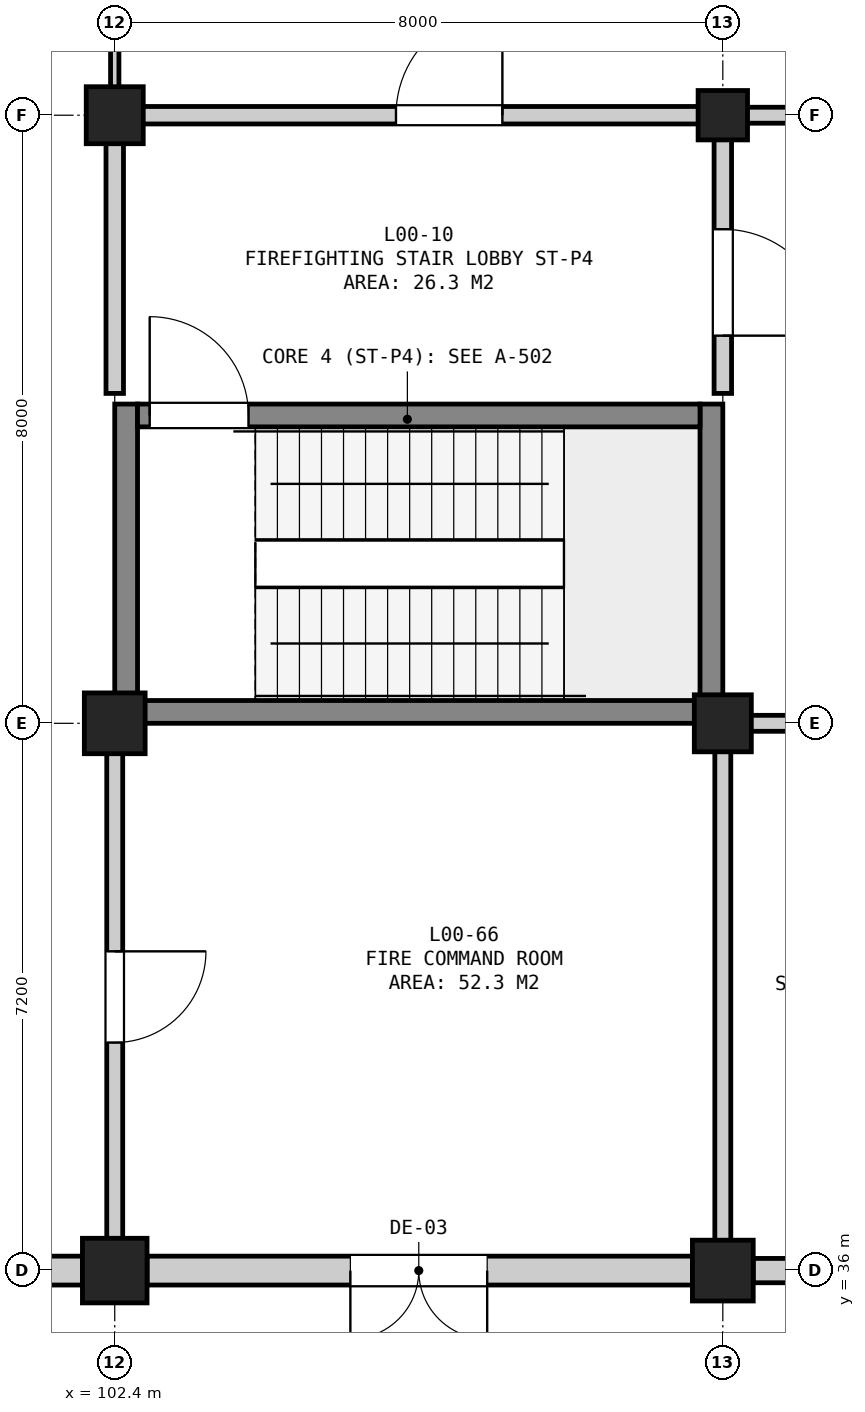
"""IFC4 building model, lengths in metres.
Left out: names, types, materials, properties, quantities, classifications, styles, units other than length and angle.
Written with IfcOpenShell. Run it as: python <this file> out.ifc"""

import sys

from ifc_helpers import new_model, si_unit, direction, frame, frame_2d, origin, origin_2d, place, context, subcontext, project, spatial, rectangle, extrude, element, fill, save


model = new_model("IFC4")
c1 = context("Model", 3, precision=1e-05, world=origin(), true_north=direction((0.0, 1.0)))
c2 = subcontext(c1, "Body", "Model", "MODEL_VIEW")
j1 = project(units=[si_unit("LENGTHUNIT", "METRE"), si_unit("PLANEANGLEUNIT", "RADIAN")], contexts=[c1])
p1 = place(None, origin())
s1 = spatial("IfcSite", under=j1, at=p1, CompositionType="ELEMENT")
p2 = place(p1, origin())
s2 = spatial("IfcBuilding", under=s1, at=p2, CompositionType="ELEMENT")
p3 = place(p2, origin())
s3 = spatial("IfcBuildingStorey", under=s2, at=p3, CompositionType="ELEMENT", Elevation=0.0)
p4 = place(p3, frame((102.4, 36.0, 0.0), z_axis=(0.0, 0.0, 1.0), x_axis=(1.0, 0.0, 0.0)))
e1 = element("IfcColumn", 1, at=p4, inside=s3, PredefinedType="COLUMN", context=c2, shape_type="SweptSolid", body=[
    extrude(rectangle(XDim=0.85, YDim=0.85, at=origin_2d()), origin(), (0.0, 0.0, 1.0), 5.4),
])
p5 = place(p3, frame((102.4, 43.2, 0.0), z_axis=(0.0, 0.0, 1.0), x_axis=(1.0, 0.0, 0.0)))
e2 = element("IfcColumn", 2, at=p5, inside=s3, PredefinedType="COLUMN", context=c2, shape_type="SweptSolid", body=[
    extrude(rectangle(XDim=0.8, YDim=0.8, at=origin_2d()), origin(), (0.0, 0.0, 1.0), 5.4),
])
p6 = place(p3, frame((102.4, 51.2, 0.0), z_axis=(0.0, 0.0, 1.0), x_axis=(1.0, 0.0, 0.0)))
e3 = element("IfcColumn", 3, at=p6, inside=s3, PredefinedType="COLUMN", context=c2, shape_type="SweptSolid", body=[
    extrude(rectangle(XDim=0.75, YDim=0.75, at=origin_2d()), origin(), (0.0, 0.0, 1.0), 5.4),
])
p7 = place(p3, frame((110.4, 36.0, 0.0), z_axis=(0.0, 0.0, 1.0), x_axis=(1.0, 0.0, 0.0)))
e4 = element("IfcColumn", 4, at=p7, inside=s3, PredefinedType="COLUMN", context=c2, shape_type="SweptSolid", body=[
    extrude(rectangle(XDim=0.8, YDim=0.8, at=origin_2d()), origin(), (0.0, 0.0, 1.0), 5.4),
])
p8 = place(p3, frame((110.4, 43.2, 0.0), z_axis=(0.0, 0.0, 1.0), x_axis=(1.0, 0.0, 0.0)))
e5 = element("IfcColumn", 5, at=p8, inside=s3, PredefinedType="COLUMN", context=c2, shape_type="SweptSolid", body=[
    extrude(rectangle(XDim=0.75, YDim=0.75, at=origin_2d()), origin(), (0.0, 0.0, 1.0), 5.4),
])
p9 = place(p3, frame((110.4, 51.2, 0.0), z_axis=(0.0, 0.0, 1.0), x_axis=(1.0, 0.0, 0.0)))
e6 = element("IfcColumn", 6, at=p9, inside=s3, PredefinedType="COLUMN", context=c2, shape_type="SweptSolid", body=[
    extrude(rectangle(XDim=0.65, YDim=0.65, at=origin_2d()), origin(), (0.0, 0.0, 1.0), 5.4),
])
p10 = place(p3, frame((86.6, 36.0, 0.0), z_axis=(0.0, 0.0, 1.0), x_axis=(1.0, 0.0, 0.0)))
e7 = element("IfcWall", 7, at=p10, inside=s3, PredefinedType="SOLIDWALL", context=c2, shape_type="SweptSolid", body=[
    extrude(rectangle(XDim=15.375, YDim=0.38, at=frame_2d((7.688, 0.0))), origin(), (0.0, 0.0, 1.0), 4.065),
])
p11 = place(p10, frame((3.6, 0.0, 0.0)))
e8 = element("IfcOpeningElement", 8, at=p11, cuts=e7, PredefinedType="OPENING", context=c2, shape_type="SweptSolid", body=[
    extrude(rectangle(XDim=2.0, YDim=2.5, at=frame_2d((1.0, 1.25))), frame((0.0, 0.202, 0.0), z_axis=(0.0, -1.0, 0.0), x_axis=(1.0, 0.0, 0.0)), (0.0, 0.0, 1.0), 0.404),
])
p12 = place(p10, frame((10.8, 0.0, 0.0)))
e9 = element("IfcOpeningElement", 9, at=p12, cuts=e7, PredefinedType="OPENING", context=c2, shape_type="SweptSolid", body=[
    extrude(rectangle(XDim=2.0, YDim=2.5, at=frame_2d((1.0, 1.25))), frame((0.0, 0.202, 0.0), z_axis=(0.0, -1.0, 0.0), x_axis=(1.0, 0.0, 0.0)), (0.0, 0.0, 1.0), 0.404),
])
p13 = place(p3, frame((102.825, 36.0, 0.0), z_axis=(0.0, 0.0, 1.0), x_axis=(1.0, 0.0, 0.0)))
e10 = element("IfcWall", 10, at=p13, inside=s3, PredefinedType="SOLIDWALL", context=c2, shape_type="SweptSolid", body=[
    extrude(rectangle(XDim=7.175, YDim=0.38, at=frame_2d((3.587, 0.0))), origin(), (0.0, 0.0, 1.0), 4.48),
])
p14 = place(p13, frame((2.675, 0.0, 0.0)))
e11 = element("IfcOpeningElement", 11, at=p14, cuts=e10, PredefinedType="OPENING", context=c2, shape_type="SweptSolid", body=[
    extrude(rectangle(XDim=1.8, YDim=2.25, at=frame_2d((0.9, 1.125))), frame((0.0, 0.202, 0.0), z_axis=(0.0, -1.0, 0.0), x_axis=(1.0, 0.0, 0.0)), (0.0, 0.0, 1.0), 0.404),
])
p15 = place(p3, frame((110.8, 36.0, 0.0), z_axis=(0.0, 0.0, 1.0), x_axis=(1.0, 0.0, 0.0)))
e12 = element("IfcWall", 12, at=p15, inside=s3, PredefinedType="SOLIDWALL", context=c2, shape_type="SweptSolid", body=[
    extrude(rectangle(XDim=5.625, YDim=0.32, at=frame_2d((2.812, 0.0))), origin(), (0.0, 0.0, 1.0), 4.465),
])
p16 = place(p15, frame((1.9, 0.0, 0.0)))
e13 = element("IfcOpeningElement", 13, at=p16, cuts=e12, PredefinedType="OPENING", context=c2, shape_type="SweptSolid", body=[
    extrude(rectangle(XDim=1.8, YDim=2.25, at=frame_2d((0.9, 1.125))), frame((0.0, 0.172, 0.0), z_axis=(0.0, -1.0, 0.0), x_axis=(1.0, 0.0, 0.0)), (0.0, 0.0, 1.0), 0.344),
])
for number, where, z_axis, x_axis in (
    (14, (102.55, 43.2, 0.0), (0.0, 0.0, 1.0), (0.0, 1.0, 0.0)),
    (15, (110.25, 43.2, 0.0), (0.0, 0.0, 1.0), (0.0, 1.0, 0.0)),
):
    element("IfcWall", number, at=place(p3, frame(where, z_axis=z_axis, x_axis=x_axis)), inside=s3, PredefinedType="SHEAR", context=c2, shape_type="SweptSolid", body=[
        extrude(rectangle(XDim=4.2, YDim=0.3, at=frame_2d((2.1, 0.0))), origin(), (0.0, 0.0, 1.0), 5.08),
    ])
p17 = place(p3, frame((102.7, 43.35, 0.0), z_axis=(0.0, 0.0, 1.0), x_axis=(1.0, 0.0, 0.0)))
e16 = element("IfcWall", 16, at=p17, inside=s3, PredefinedType="SHEAR", context=c2, shape_type="SweptSolid", body=[
    extrude(rectangle(XDim=7.4, YDim=0.3, at=frame_2d((3.7, 0.0))), origin(), (0.0, 0.0, 1.0), 5.08),
])
p18 = place(p3, frame((102.7, 47.25, 0.0), z_axis=(0.0, 0.0, 1.0), x_axis=(1.0, 0.0, 0.0)))
e17 = element("IfcWall", 17, at=p18, inside=s3, PredefinedType="SHEAR", context=c2, shape_type="SweptSolid", body=[
    extrude(rectangle(XDim=7.4, YDim=0.3, at=frame_2d((3.7, 0.0))), origin(), (0.0, 0.0, 1.0), 5.08),
])
p19 = place(p18, frame((0.16, 0.0, 0.0)))
e18 = element("IfcOpeningElement", 18, at=p19, cuts=e17, PredefinedType="OPENING", context=c2, shape_type="SweptSolid", body=[
    extrude(rectangle(XDim=1.3, YDim=2.18, at=frame_2d((0.65, 1.09))), frame((0.0, 0.162, 0.0), z_axis=(0.0, -1.0, 0.0), x_axis=(1.0, 0.0, 0.0)), (0.0, 0.0, 1.0), 0.324),
])
p20 = place(p3, frame((102.54, 51.2, 0.0), z_axis=(0.0, 0.0, 1.0), x_axis=(1.0, 0.0, 0.0)))
e19 = element("IfcWall", 19, at=p20, inside=s3, PredefinedType="SOLIDWALL", context=c2, shape_type="SweptSolid", body=[
    extrude(rectangle(XDim=7.72, YDim=0.23, at=frame_2d((3.86, 0.0))), origin(), (0.0, 0.0, 1.0), 4.815),
])
p21 = place(p20, frame((3.56, 0.0, 0.0)))
e20 = element("IfcOpeningElement", 20, at=p21, cuts=e19, PredefinedType="OPENING", context=c2, shape_type="SweptSolid", body=[
    extrude(rectangle(XDim=1.4, YDim=2.2, at=frame_2d((0.7, 1.1))), frame((0.0, 0.127, 0.0), z_axis=(0.0, -1.0, 0.0), x_axis=(1.0, 0.0, 0.0)), (0.0, 0.0, 1.0), 0.254),
])
p22 = place(p3, frame((102.4, 47.54, 0.0), z_axis=(0.0, 0.0, 1.0), x_axis=(0.0, 1.0, 0.0)))
e21 = element("IfcWall", 21, at=p22, inside=s3, PredefinedType="SOLIDWALL", context=c2, shape_type="SweptSolid", body=[
    extrude(rectangle(XDim=3.52, YDim=0.23, at=frame_2d((1.76, 0.0))), origin(), (0.0, 0.0, 1.0), 4.325),
])
p23 = place(p3, frame((110.4, 47.54, 0.0), z_axis=(0.0, 0.0, 1.0), x_axis=(0.0, 1.0, 0.0)))
e22 = element("IfcWall", 22, at=p23, inside=s3, PredefinedType="SOLIDWALL", context=c2, shape_type="SweptSolid", body=[
    extrude(rectangle(XDim=3.52, YDim=0.23, at=frame_2d((1.76, 0.0))), origin(), (0.0, 0.0, 1.0), 4.625),
])
p24 = place(p23, frame((0.76, 0.0, 0.0)))
e23 = element("IfcOpeningElement", 23, at=p24, cuts=e22, PredefinedType="OPENING", context=c2, shape_type="SweptSolid", body=[
    extrude(rectangle(XDim=1.4, YDim=2.2, at=frame_2d((0.7, 1.1))), frame((0.0, 0.127, 0.0), z_axis=(0.0, -1.0, 0.0), x_axis=(1.0, 0.0, 0.0)), (0.0, 0.0, 1.0), 0.254),
])
p25 = place(p3, frame((110.54, 43.2, 0.0), z_axis=(0.0, 0.0, 1.0), x_axis=(1.0, 0.0, 0.0)))
e24 = element("IfcWall", 24, at=p25, inside=s3, PredefinedType="SOLIDWALL", context=c2, shape_type="SweptSolid", body=[
    extrude(rectangle(XDim=6.12, YDim=0.21, at=frame_2d((3.06, 0.0))), origin(), (0.0, 0.0, 1.0), 4.225),
])
p26 = place(p25, frame((2.26, 0.0, 0.0)))
e25 = element("IfcOpeningElement", 25, at=p26, cuts=e24, PredefinedType="OPENING", context=c2, shape_type="SweptSolid", body=[
    extrude(rectangle(XDim=1.6, YDim=2.2, at=frame_2d((0.8, 1.1))), frame((0.0, 0.117, 0.0), z_axis=(0.0, -1.0, 0.0), x_axis=(1.0, 0.0, 0.0)), (0.0, 0.0, 1.0), 0.234),
])
p27 = place(p3, frame((110.54, 51.2, 0.0), z_axis=(0.0, 0.0, 1.0), x_axis=(1.0, 0.0, 0.0)))
e26 = element("IfcWall", 26, at=p27, inside=s3, PredefinedType="SOLIDWALL", context=c2, shape_type="SweptSolid", body=[
    extrude(rectangle(XDim=6.12, YDim=0.21, at=frame_2d((3.06, 0.0))), origin(), (0.0, 0.0, 1.0), 4.225),
])
p28 = place(p3, frame((110.4, 36.105, 0.0), z_axis=(0.0, 0.0, 1.0), x_axis=(0.0, 1.0, 0.0)))
e27 = element("IfcWall", 27, at=p28, inside=s3, PredefinedType="SOLIDWALL", context=c2, shape_type="SweptSolid", body=[
    extrude(rectangle(XDim=6.955, YDim=0.21, at=frame_2d((3.478, 0.0))), origin(), (0.0, 0.0, 1.0), 4.525),
])
p29 = place(p3, frame((102.4, 36.105, 0.0), z_axis=(0.0, 0.0, 1.0), x_axis=(0.0, 1.0, 0.0)))
e28 = element("IfcWall", 28, at=p29, inside=s3, PredefinedType="SOLIDWALL", context=c2, shape_type="SweptSolid", body=[
    extrude(rectangle(XDim=6.955, YDim=0.21, at=frame_2d((3.478, 0.0))), origin(), (0.0, 0.0, 1.0), 4.625),
])
p30 = place(p29, frame((2.895, 0.0, 0.0)))
e29 = element("IfcOpeningElement", 29, at=p30, cuts=e28, PredefinedType="OPENING", context=c2, shape_type="SweptSolid", body=[
    extrude(rectangle(XDim=1.2, YDim=2.2, at=frame_2d((0.6, 1.1))), frame((0.0, 0.117, 0.0), z_axis=(0.0, -1.0, 0.0), x_axis=(1.0, 0.0, 0.0)), (0.0, 0.0, 1.0), 0.234),
])
p31 = place(p3, frame((102.4, 51.34, 0.0), z_axis=(0.0, 0.0, 1.0), x_axis=(0.0, 1.0, 0.0)))
e30 = element("IfcWall", 30, at=p31, inside=s3, PredefinedType="PARTITIONING", context=c2, shape_type="SweptSolid", body=[
    extrude(rectangle(XDim=7.72, YDim=0.11, at=frame_2d((3.86, 0.0))), origin(), (0.0, 0.0, 1.0), 4.375),
])
p32 = place(p31, frame((3.11, 0.0, 0.0)))
e31 = element("IfcOpeningElement", 31, at=p32, cuts=e30, PredefinedType="OPENING", context=c2, shape_type="SweptSolid", body=[
    extrude(rectangle(XDim=1.5, YDim=2.2, at=frame_2d((0.75, 1.1))), frame((0.0, 0.067, 0.0), z_axis=(0.0, -1.0, 0.0), x_axis=(1.0, 0.0, 0.0)), (0.0, 0.0, 1.0), 0.134),
])
p33 = place(p14, frame((1.8, 0.0, 0.0), z_axis=(0.0, 0.0, 1.0), x_axis=(-1.0, 0.0, 0.0)))
e32 = element("IfcDoor", 32, at=p33, inside=s3, OperationType="DOUBLE_DOOR_SINGLE_SWING", PredefinedType="DOOR", context=c2, shape_type="SweptSolid", body=[
    extrude(rectangle(XDim=1.8, YDim=2.25, at=frame_2d((0.9, 1.125))), frame((0.0, 0.025, 0.0), z_axis=(0.0, -1.0, 0.0), x_axis=(1.0, 0.0, 0.0)), (0.0, 0.0, 1.0), 0.05),
])
fill(e11, e32)
p34 = place(p19, origin())
e33 = element("IfcDoor", 33, at=p34, inside=s3, OperationType="SINGLE_SWING_LEFT", PredefinedType="DOOR", context=c2, shape_type="SweptSolid", body=[
    extrude(rectangle(XDim=1.3, YDim=2.18, at=frame_2d((0.65, 1.09))), frame((0.0, 0.025, 0.0), z_axis=(0.0, -1.0, 0.0), x_axis=(1.0, 0.0, 0.0)), (0.0, 0.0, 1.0), 0.05),
])
fill(e18, e33)
p35 = place(p21, origin())
e34 = element("IfcDoor", 34, at=p35, inside=s3, OperationType="SINGLE_SWING_RIGHT", PredefinedType="DOOR", context=c2, shape_type="SweptSolid", body=[
    extrude(rectangle(XDim=1.4, YDim=2.2, at=frame_2d((0.7, 1.1))), frame((0.0, 0.025, 0.0), z_axis=(0.0, -1.0, 0.0), x_axis=(1.0, 0.0, 0.0)), (0.0, 0.0, 1.0), 0.05),
])
fill(e20, e34)
p36 = place(p24, frame((1.4, 0.0, 0.0), z_axis=(0.0, 0.0, 1.0), x_axis=(-1.0, 0.0, 0.0)))
e35 = element("IfcDoor", 35, at=p36, inside=s3, OperationType="SINGLE_SWING_RIGHT", PredefinedType="DOOR", context=c2, shape_type="SweptSolid", body=[
    extrude(rectangle(XDim=1.4, YDim=2.2, at=frame_2d((0.7, 1.1))), frame((0.0, 0.025, 0.0), z_axis=(0.0, -1.0, 0.0), x_axis=(1.0, 0.0, 0.0)), (0.0, 0.0, 1.0), 0.05),
])
fill(e23, e35)
p37 = place(p30, frame((1.2, 0.0, 0.0), z_axis=(0.0, 0.0, 1.0), x_axis=(-1.0, 0.0, 0.0)))
e36 = element("IfcDoor", 36, at=p37, inside=s3, OperationType="SINGLE_SWING_LEFT", PredefinedType="DOOR", context=c2, shape_type="SweptSolid", body=[
    extrude(rectangle(XDim=1.2, YDim=2.2, at=frame_2d((0.6, 1.1))), frame((0.0, 0.025, 0.0), z_axis=(0.0, -1.0, 0.0), x_axis=(1.0, 0.0, 0.0)), (0.0, 0.0, 1.0), 0.05),
])
fill(e29, e36)
save(model, sys.argv[1])
